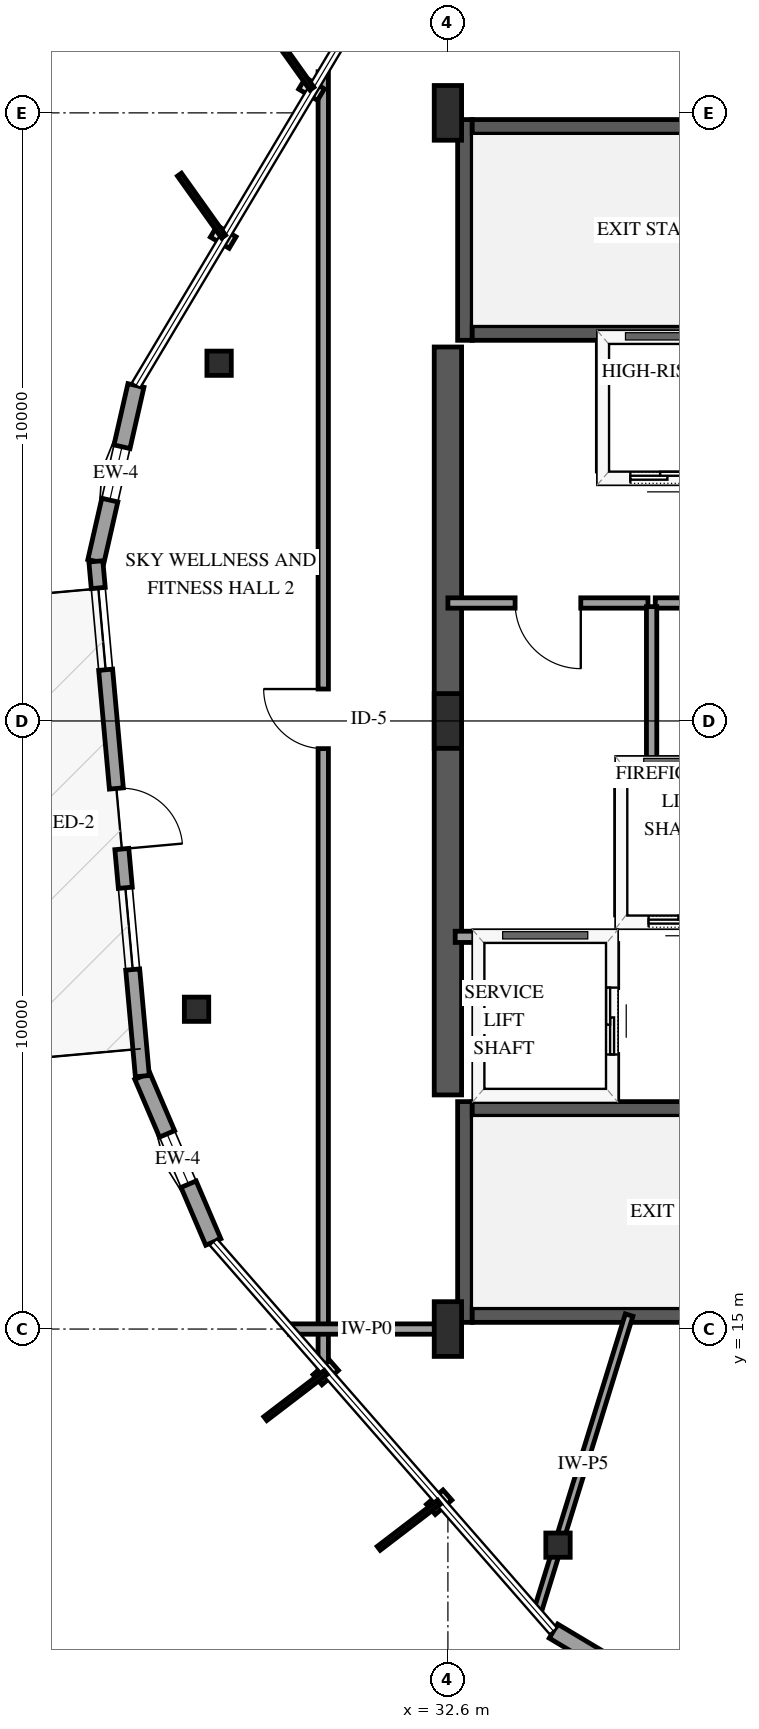
"""IFC4 building model, lengths in metres.
Left out: names, types, materials, properties, quantities, classifications, styles, units other than length and angle.
Written with IfcOpenShell. Run it as: python <this file> out.ifc"""

import sys

from ifc_helpers import new_model, si_unit, direction, frame, frame_2d, origin, origin_2d, place, context, subcontext, project, spatial, rectangle, i_section, extrude, element, fill, save


model = new_model("IFC4")
c1 = context("Model", 3, precision=1e-05, world=origin(), true_north=direction((0.0, 1.0)))
c2 = subcontext(c1, "Body", "Model", "MODEL_VIEW")
j1 = project(units=[si_unit("LENGTHUNIT", "METRE"), si_unit("PLANEANGLEUNIT", "RADIAN")], contexts=[c1])
p1 = place(None, origin())
s1 = spatial("IfcSite", under=j1, at=p1, CompositionType="ELEMENT")
p2 = place(p1, origin())
s2 = spatial("IfcBuilding", under=s1, at=p2, CompositionType="ELEMENT")
p3 = place(p2, frame((0.0, 0.0, 250.0)))
s3 = spatial("IfcBuildingStorey", under=s2, at=p3, CompositionType="ELEMENT", Elevation=250.0)
p4 = place(p3, frame((32.88, 15.11, 0.0), z_axis=(0.0, 0.0, 1.0), x_axis=(0.0, 1.0, 0.0)))
e1 = element("IfcWall", 1, at=p4, inside=s3, PredefinedType="SHEAR", context=c2, shape_type="SweptSolid", body=[
    extrude(rectangle(XDim=3.63, YDim=0.24, at=frame_2d((1.815, 0.0))), origin(), (0.0, 0.0, 1.0), 3.75),
])
for number, where, z_axis, x_axis in (
    (2, (33.0, 15.23, 0.0), (0.0, 0.0, 1.0), (1.0, 0.0, 0.0)),
    (3, (33.0, 18.62, 0.0), (0.0, 0.0, 1.0), (1.0, 0.0, 0.0)),
):
    element("IfcWall", number, at=place(p3, frame(where, z_axis=z_axis, x_axis=x_axis)), inside=s3, PredefinedType="SHEAR", context=c2, shape_type="SweptSolid", body=[
        extrude(rectangle(XDim=8.0, YDim=0.24, at=frame_2d((4.0, 0.0))), origin(), (0.0, 0.0, 1.0), 3.75),
    ])
p5 = place(p3, frame((32.88, 31.26, 0.0), z_axis=(0.0, 0.0, 1.0), x_axis=(0.0, 1.0, 0.0)))
e4 = element("IfcWall", 4, at=p5, inside=s3, PredefinedType="SHEAR", context=c2, shape_type="SweptSolid", body=[
    extrude(rectangle(XDim=3.63, YDim=0.24, at=frame_2d((1.815, 0.0))), origin(), (0.0, 0.0, 1.0), 3.75),
])
for number, where, z_axis, x_axis in (
    (5, (33.0, 31.38, 0.0), (0.0, 0.0, 1.0), (1.0, 0.0, 0.0)),
    (6, (33.0, 34.77, 0.0), (0.0, 0.0, 1.0), (1.0, 0.0, 0.0)),
):
    element("IfcWall", number, at=place(p3, frame(where, z_axis=z_axis, x_axis=x_axis)), inside=s3, PredefinedType="SHEAR", context=c2, shape_type="SweptSolid", body=[
        extrude(rectangle(XDim=8.0, YDim=0.24, at=frame_2d((4.0, 0.0))), origin(), (0.0, 0.0, 1.0), 3.75),
    ])
p6 = place(p3, frame((32.6, 18.85, 0.0), z_axis=(0.0, 0.0, 1.0), x_axis=(0.0, 1.0, 0.0)))
e7 = element("IfcWall", 7, at=p6, inside=s3, PredefinedType="SHEAR", context=c2, shape_type="SweptSolid", body=[
    extrude(rectangle(XDim=12.3, YDim=0.45, at=frame_2d((6.15, 0.0))), origin(), (0.0, 0.0, 1.0), 3.75),
])
for number, where, z_axis, x_axis in (
    (8, (32.6, 15.0, 0.0), (0.0, 0.0, 1.0), (1.0, 0.0, 0.0)),
    (9, (32.6, 25.0, 0.0), (0.0, 0.0, 1.0), (1.0, 0.0, 0.0)),
    (10, (32.6, 35.0, 0.0), (0.0, 0.0, 1.0), (1.0, 0.0, 0.0)),
):
    element("IfcColumn", number, at=place(p3, frame(where, z_axis=z_axis, x_axis=x_axis)), inside=s3, PredefinedType="PILASTER", context=c2, shape_type="SweptSolid", body=[
        extrude(rectangle(XDim=0.45, YDim=0.9, at=origin_2d()), origin(), (0.0, 0.0, 1.0), 3.75),
    ])
for number, where, z_axis, x_axis in (
    (11, (28.837, 30.883, 0.0), (0.0, 0.0, 1.0), (1.0, 0.0, 0.0)),
    (12, (28.466, 20.259, 0.0), (0.0, 0.0, 1.0), (1.0, 0.0, 0.0)),
    (13, (34.411, 11.446, 0.0), (0.0, 0.0, 1.0), (1.0, 0.0, 0.0)),
):
    element("IfcColumn", number, at=place(p3, frame(where, z_axis=z_axis, x_axis=x_axis)), inside=s3, PredefinedType="COLUMN", context=c2, shape_type="SweptSolid", body=[
        extrude(i_section(OverallWidth=0.401, OverallDepth=0.399, WebThickness=0.025, FlangeThickness=0.04, FilletRadius=0.038, at=origin_2d()), origin(), (0.0, 0.0, 1.0), 3.75),
    ])
p7 = place(p3, frame((27.469, 30.517, 0.0), z_axis=(0.0, 0.0, 1.0), x_axis=(-0.222190162384, -0.975003349604, 0.0)))
e14 = element("IfcWall", 14, at=p7, inside=s3, PredefinedType="SOLIDWALL", context=c2, shape_type="SweptSolid", body=[
    extrude(rectangle(XDim=2.967, YDim=0.27, at=frame_2d((1.483, 0.0))), origin(), (0.0, 0.0, 1.0), 2.829),
])
p8 = place(p7, frame((1.033, 0.0, 0.75)))
e15 = element("IfcOpeningElement", 15, at=p8, cuts=e14, PredefinedType="OPENING", context=c2, shape_type="SweptSolid", body=[
    extrude(rectangle(XDim=0.9, YDim=1.5, at=frame_2d((0.45, 0.75))), frame((0.0, 0.145, 0.0), z_axis=(0.0, -1.0, 0.0), x_axis=(1.0, 0.0, 0.0)), (0.0, 0.0, 1.0), 0.29),
])
p9 = place(p3, frame((27.575, 19.159, 0.0), z_axis=(0.0, 0.0, 1.0), x_axis=(0.393392799369, -0.919370494091, 0.0)))
e16 = element("IfcWall", 16, at=p9, inside=s3, PredefinedType="SOLIDWALL", context=c2, shape_type="SweptSolid", body=[
    extrude(rectangle(XDim=2.967, YDim=0.27, at=frame_2d((1.483, 0.0))), origin(), (0.0, 0.0, 1.0), 2.829),
])
p10 = place(p9, frame((1.033, 0.0, 0.75)))
e17 = element("IfcOpeningElement", 17, at=p10, cuts=e16, PredefinedType="OPENING", context=c2, shape_type="SweptSolid", body=[
    extrude(rectangle(XDim=0.9, YDim=1.5, at=frame_2d((0.45, 0.75))), frame((0.0, 0.145, 0.0), z_axis=(0.0, -1.0, 0.0), x_axis=(1.0, 0.0, 0.0)), (0.0, 0.0, 1.0), 0.29),
])
p11 = place(p3, frame((26.81, 27.625, 0.0), z_axis=(0.0, 0.0, 1.0), x_axis=(0.089932307003, -0.995947880241, 0.0)))
e18 = element("IfcWall", 18, at=p11, inside=s3, PredefinedType="SOLIDWALL", context=c2, shape_type="SweptSolid", body=[
    extrude(rectangle(XDim=8.5, YDim=0.23, at=frame_2d((4.25, 0.0))), origin(), (0.0, 0.0, 1.0), 2.829),
])
p12 = place(p11, frame((3.75, 0.0, 0.0)))
e19 = element("IfcOpeningElement", 19, at=p12, cuts=e18, PredefinedType="OPENING", context=c2, shape_type="SweptSolid", body=[
    extrude(rectangle(XDim=1.0, YDim=2.15, at=frame_2d((0.5, 1.075))), frame((0.0, 0.125, 0.0), z_axis=(0.0, -1.0, 0.0), x_axis=(1.0, 0.0, 0.0)), (0.0, 0.0, 1.0), 0.25),
])
p13 = place(p11, frame((0.44, 0.0, 0.72)))
e20 = element("IfcOpeningElement", 20, at=p13, cuts=e18, PredefinedType="OPENING", context=c2, shape_type="SweptSolid", body=[
    extrude(rectangle(XDim=1.35, YDim=1.65, at=frame_2d((0.675, 0.825))), frame((0.0, 0.125, 0.0), z_axis=(0.0, -1.0, 0.0), x_axis=(1.0, 0.0, 0.0)), (0.0, 0.0, 1.0), 0.25),
])
p14 = place(p11, frame((5.39, 0.0, 0.72)))
e21 = element("IfcOpeningElement", 21, at=p14, cuts=e18, PredefinedType="OPENING", context=c2, shape_type="SweptSolid", body=[
    extrude(rectangle(XDim=1.35, YDim=1.65, at=frame_2d((0.675, 0.825))), frame((0.0, 0.125, 0.0), z_axis=(0.0, -1.0, 0.0), x_axis=(1.0, 0.0, 0.0)), (0.0, 0.0, 1.0), 0.25),
])
p15 = place(p3, frame((34.336, 10.032, 0.0), z_axis=(0.0, 0.0, 1.0), x_axis=(0.858609177154, -0.512630745183, 0.0)))
e22 = element("IfcWall", 22, at=p15, inside=s3, PredefinedType="SOLIDWALL", context=c2, shape_type="SweptSolid", body=[
    extrude(rectangle(XDim=2.967, YDim=0.27, at=frame_2d((1.483, 0.0))), origin(), (0.0, 0.0, 1.0), 2.829),
])
p16 = place(p15, frame((1.033, 0.0, 0.75)))
e23 = element("IfcOpeningElement", 23, at=p16, cuts=e22, PredefinedType="OPENING", context=c2, shape_type="SweptSolid", body=[
    extrude(rectangle(XDim=0.9, YDim=1.5, at=frame_2d((0.45, 0.75))), frame((0.0, 0.145, 0.0), z_axis=(0.0, -1.0, 0.0), x_axis=(1.0, 0.0, 0.0)), (0.0, 0.0, 1.0), 0.29),
])
p17 = place(p3, frame((35.45, 21.7, 0.0), z_axis=(0.0, 0.0, 1.0), x_axis=(1.0, 0.0, 0.0)))
e24 = element("IfcWall", 24, at=p17, inside=s3, PredefinedType="SOLIDWALL", context=c2, shape_type="SweptSolid", body=[
    extrude(rectangle(XDim=2.0, YDim=0.185, at=frame_2d((1.0, 0.0))), origin(), (0.0, 0.0, 1.0), 2.824),
])
p18 = place(p17, frame((0.45, 0.0, 0.0)))
e25 = element("IfcOpeningElement", 25, at=p18, cuts=e24, PredefinedType="OPENING", context=c2, shape_type="SweptSolid", body=[
    extrude(rectangle(XDim=1.1, YDim=2.15, at=frame_2d((0.55, 1.075))), frame((0.0, 0.103, 0.0), z_axis=(0.0, -1.0, 0.0), x_axis=(1.0, 0.0, 0.0)), (0.0, 0.0, 1.0), 0.205),
])
p19 = place(p3, frame((35.45, 24.3, 0.0), z_axis=(0.0, 0.0, 1.0), x_axis=(1.0, 0.0, 0.0)))
e26 = element("IfcWall", 26, at=p19, inside=s3, PredefinedType="SOLIDWALL", context=c2, shape_type="SweptSolid", body=[
    extrude(rectangle(XDim=2.0, YDim=0.185, at=frame_2d((1.0, 0.0))), origin(), (0.0, 0.0, 1.0), 2.824),
])
p20 = place(p3, frame((35.45, 21.81, 0.0), z_axis=(0.0, 0.0, 1.0), x_axis=(0.0, 1.0, 0.0)))
e27 = element("IfcWall", 27, at=p20, inside=s3, PredefinedType="SOLIDWALL", context=c2, shape_type="SweptSolid", body=[
    extrude(rectangle(XDim=2.38, YDim=0.185, at=frame_2d((1.19, 0.0))), origin(), (0.0, 0.0, 1.0), 3.45),
])
p21 = place(p3, frame((32.72, 21.45, 0.0), z_axis=(0.0, 0.0, 1.0), x_axis=(1.0, 0.0, 0.0)))
e28 = element("IfcWall", 28, at=p21, inside=s3, PredefinedType="SOLIDWALL", context=c2, shape_type="SweptSolid", body=[
    extrude(rectangle(XDim=2.58, YDim=0.185, at=frame_2d((1.29, 0.0))), origin(), (0.0, 0.0, 1.0), 2.824),
])
p22 = place(p3, frame((35.3, 18.79, 0.0), z_axis=(0.0, 0.0, 1.0), x_axis=(0.0, 1.0, 0.0)))
e29 = element("IfcWall", 29, at=p22, inside=s3, PredefinedType="SOLIDWALL", context=c2, shape_type="SweptSolid", body=[
    extrude(rectangle(XDim=2.55, YDim=0.185, at=frame_2d((1.275, 0.0))), origin(), (0.0, 0.0, 1.0), 3.45),
])
p23 = place(p22, frame((0.725, 0.0, 0.0)))
e30 = element("IfcOpeningElement", 30, at=p23, cuts=e29, PredefinedType="OPENING", context=c2, shape_type="SweptSolid", body=[
    extrude(rectangle(XDim=1.1, YDim=2.15, at=frame_2d((0.55, 1.075))), frame((0.0, 0.103, 0.0), z_axis=(0.0, -1.0, 0.0), x_axis=(1.0, 0.0, 0.0)), (0.0, 0.0, 1.0), 0.205),
])
p24 = place(p3, frame((35.15, 29.0, 0.0), z_axis=(0.0, 0.0, 1.0), x_axis=(1.0, 0.0, 0.0)))
e31 = element("IfcWall", 31, at=p24, inside=s3, PredefinedType="SOLIDWALL", context=c2, shape_type="SweptSolid", body=[
    extrude(rectangle(XDim=2.0, YDim=0.185, at=frame_2d((1.0, 0.0))), origin(), (0.0, 0.0, 1.0), 3.45),
])
p25 = place(p24, frame((0.45, 0.0, 0.0)))
e32 = element("IfcOpeningElement", 32, at=p25, cuts=e31, PredefinedType="OPENING", context=c2, shape_type="SweptSolid", body=[
    extrude(rectangle(XDim=1.1, YDim=2.15, at=frame_2d((0.55, 1.075))), frame((0.0, 0.103, 0.0), z_axis=(0.0, -1.0, 0.0), x_axis=(1.0, 0.0, 0.0)), (0.0, 0.0, 1.0), 0.205),
])
p26 = place(p3, frame((35.15, 29.11, 0.0), z_axis=(0.0, 0.0, 1.0), x_axis=(0.0, 1.0, 0.0)))
e33 = element("IfcWall", 33, at=p26, inside=s3, PredefinedType="SOLIDWALL", context=c2, shape_type="SweptSolid", body=[
    extrude(rectangle(XDim=2.1, YDim=0.185, at=frame_2d((1.05, 0.0))), origin(), (0.0, 0.0, 1.0), 3.45),
])
p27 = place(p3, frame((30.55, 14.363, 0.0), z_axis=(0.0, 0.0, 1.0), x_axis=(0.0, 1.0, 0.0)))
e34 = element("IfcWall", 34, at=p27, inside=s3, PredefinedType="PARTITIONING", context=c2, shape_type="SweptSolid", body=[
    extrude(rectangle(XDim=21.313, YDim=0.17, at=frame_2d((10.656, 0.0))), origin(), (0.0, 0.0, 1.0), 3.45),
])
p28 = place(p27, frame((10.182, 0.0, 0.0)))
e35 = element("IfcOpeningElement", 35, at=p28, cuts=e34, PredefinedType="OPENING", context=c2, shape_type="SweptSolid", body=[
    extrude(rectangle(XDim=0.98, YDim=2.15, at=frame_2d((0.49, 1.075))), frame((0.0, 0.095, 0.0), z_axis=(0.0, -1.0, 0.0), x_axis=(1.0, 0.0, 0.0)), (0.0, 0.0, 1.0), 0.19),
])
p29 = place(p3, frame((41.16, 26.94, 0.0), z_axis=(0.0, 0.0, 1.0), x_axis=(-1.0, 0.0, 0.0)))
e36 = element("IfcWall", 36, at=p29, inside=s3, PredefinedType="PARTITIONING", context=c2, shape_type="SweptSolid", body=[
    extrude(rectangle(XDim=5.15, YDim=0.17, at=frame_2d((2.575, 0.0))), origin(), (0.0, 0.0, 1.0), 3.45),
])
p30 = place(p29, frame((2.035, 0.0, 0.0)))
e37 = element("IfcOpeningElement", 37, at=p30, cuts=e36, PredefinedType="OPENING", context=c2, shape_type="SweptSolid", body=[
    extrude(rectangle(XDim=1.08, YDim=2.15, at=frame_2d((0.54, 1.075))), frame((0.0, 0.095, 0.0), z_axis=(0.0, -1.0, 0.0), x_axis=(1.0, 0.0, 0.0)), (0.0, 0.0, 1.0), 0.19),
])
p31 = place(p3, frame((35.58, 15.23, 0.0), z_axis=(0.0, 0.0, 1.0), x_axis=(-0.295281740196, -0.95541022284, 0.0)))
e38 = element("IfcWall", 38, at=p31, inside=s3, PredefinedType="PARTITIONING", context=c2, shape_type="SweptSolid", body=[
    extrude(rectangle(XDim=5.12, YDim=0.13, at=frame_2d((2.56, 0.0))), origin(), (0.0, 0.0, 1.0), 2.745),
])
p32 = place(p3, frame((35.89, 26.94, 0.0), z_axis=(0.0, 0.0, 1.0), x_axis=(-1.0, 0.0, 0.0)))
e39 = element("IfcWall", 39, at=p32, inside=s3, PredefinedType="PARTITIONING", context=c2, shape_type="SweptSolid", body=[
    extrude(rectangle(XDim=3.29, YDim=0.17, at=frame_2d((1.645, 0.0))), origin(), (0.0, 0.0, 1.0), 3.45),
])
p33 = place(p32, frame((1.105, 0.0, 0.0)))
e40 = element("IfcOpeningElement", 40, at=p33, cuts=e39, PredefinedType="OPENING", context=c2, shape_type="SweptSolid", body=[
    extrude(rectangle(XDim=1.08, YDim=2.15, at=frame_2d((0.54, 1.075))), frame((0.0, 0.095, 0.0), z_axis=(0.0, -1.0, 0.0), x_axis=(1.0, 0.0, 0.0)), (0.0, 0.0, 1.0), 0.19),
])
p34 = place(p3, frame((35.95, 26.88, 0.0), z_axis=(0.0, 0.0, 1.0), x_axis=(0.0, -1.0, 0.0)))
e41 = element("IfcWall", 41, at=p34, inside=s3, PredefinedType="PARTITIONING", context=c2, shape_type="SweptSolid", body=[
    extrude(rectangle(XDim=2.58, YDim=0.17, at=frame_2d((1.29, 0.0))), origin(), (0.0, 0.0, 1.0), 3.45),
])
p35 = place(p3, frame((32.53, 15.0, 0.0), z_axis=(0.0, 0.0, 1.0), x_axis=(-1.0, 0.0, 0.0)))
e42 = element("IfcWall", 42, at=p35, inside=s3, PredefinedType="PARTITIONING", context=c2, shape_type="SweptSolid", body=[
    extrude(rectangle(XDim=2.537, YDim=0.17, at=frame_2d((1.269, 0.0))), origin(), (0.0, 0.0, 1.0), 3.45),
])
p36 = place(p8, origin())
e43 = element("IfcWindow", 43, at=p36, inside=s3, PartitioningType="SINGLE_PANEL", PredefinedType="WINDOW", context=c2, shape_type="SweptSolid", body=[
    extrude(rectangle(XDim=0.9, YDim=1.5, at=frame_2d((0.45, 0.75))), frame((0.0, 0.03, 0.0), z_axis=(0.0, -1.0, 0.0), x_axis=(1.0, 0.0, 0.0)), (0.0, 0.0, 1.0), 0.06),
])
fill(e15, e43)
p37 = place(p10, origin())
e44 = element("IfcWindow", 44, at=p37, inside=s3, PartitioningType="SINGLE_PANEL", PredefinedType="WINDOW", context=c2, shape_type="SweptSolid", body=[
    extrude(rectangle(XDim=0.9, YDim=1.5, at=frame_2d((0.45, 0.75))), frame((0.0, 0.03, 0.0), z_axis=(0.0, -1.0, 0.0), x_axis=(1.0, 0.0, 0.0)), (0.0, 0.0, 1.0), 0.06),
])
fill(e17, e44)
p38 = place(p12, origin())
e45 = element("IfcDoor", 45, at=p38, inside=s3, OperationType="SINGLE_SWING_RIGHT", PredefinedType="DOOR", context=c2, shape_type="SweptSolid", body=[
    extrude(rectangle(XDim=1.0, YDim=2.15, at=frame_2d((0.5, 1.075))), frame((0.0, 0.025, 0.0), z_axis=(0.0, -1.0, 0.0), x_axis=(1.0, 0.0, 0.0)), (0.0, 0.0, 1.0), 0.05),
])
fill(e19, e45)
p39 = place(p13, origin())
e46 = element("IfcWindow", 46, at=p39, inside=s3, PartitioningType="SINGLE_PANEL", PredefinedType="WINDOW", context=c2, shape_type="SweptSolid", body=[
    extrude(rectangle(XDim=1.35, YDim=1.65, at=frame_2d((0.675, 0.825))), frame((0.0, 0.03, 0.0), z_axis=(0.0, -1.0, 0.0), x_axis=(1.0, 0.0, 0.0)), (0.0, 0.0, 1.0), 0.06),
])
fill(e20, e46)
p40 = place(p14, origin())
e47 = element("IfcWindow", 47, at=p40, inside=s3, PartitioningType="SINGLE_PANEL", PredefinedType="WINDOW", context=c2, shape_type="SweptSolid", body=[
    extrude(rectangle(XDim=1.35, YDim=1.65, at=frame_2d((0.675, 0.825))), frame((0.0, 0.03, 0.0), z_axis=(0.0, -1.0, 0.0), x_axis=(1.0, 0.0, 0.0)), (0.0, 0.0, 1.0), 0.06),
])
fill(e21, e47)
p41 = place(p18, origin())
e48 = element("IfcDoor", 48, at=p41, inside=s3, OperationType="SLIDING_TO_LEFT", PredefinedType="DOOR", context=c2, shape_type="SweptSolid", body=[
    extrude(rectangle(XDim=1.1, YDim=2.15, at=frame_2d((0.55, 1.075))), frame((0.0, 0.025, 0.0), z_axis=(0.0, -1.0, 0.0), x_axis=(1.0, 0.0, 0.0)), (0.0, 0.0, 1.0), 0.05),
])
fill(e25, e48)
p42 = place(p23, origin())
e49 = element("IfcDoor", 49, at=p42, inside=s3, OperationType="SLIDING_TO_LEFT", PredefinedType="DOOR", context=c2, shape_type="SweptSolid", body=[
    extrude(rectangle(XDim=1.1, YDim=2.15, at=frame_2d((0.55, 1.075))), frame((0.0, 0.025, 0.0), z_axis=(0.0, -1.0, 0.0), x_axis=(1.0, 0.0, 0.0)), (0.0, 0.0, 1.0), 0.05),
])
fill(e30, e49)
p43 = place(p25, origin())
e50 = element("IfcDoor", 50, at=p43, inside=s3, OperationType="SLIDING_TO_LEFT", PredefinedType="DOOR", context=c2, shape_type="SweptSolid", body=[
    extrude(rectangle(XDim=1.1, YDim=2.15, at=frame_2d((0.55, 1.075))), frame((0.0, 0.025, 0.0), z_axis=(0.0, -1.0, 0.0), x_axis=(1.0, 0.0, 0.0)), (0.0, 0.0, 1.0), 0.05),
])
fill(e32, e50)
p44 = place(p28, origin())
e51 = element("IfcDoor", 51, at=p44, inside=s3, OperationType="SINGLE_SWING_RIGHT", PredefinedType="DOOR", context=c2, shape_type="SweptSolid", body=[
    extrude(rectangle(XDim=0.98, YDim=2.15, at=frame_2d((0.49, 1.075))), frame((0.0, 0.025, 0.0), z_axis=(0.0, -1.0, 0.0), x_axis=(1.0, 0.0, 0.0)), (0.0, 0.0, 1.0), 0.05),
])
fill(e35, e51)
p45 = place(p33, origin())
e52 = element("IfcDoor", 52, at=p45, inside=s3, OperationType="SINGLE_SWING_LEFT", PredefinedType="DOOR", context=c2, shape_type="SweptSolid", body=[
    extrude(rectangle(XDim=1.08, YDim=2.15, at=frame_2d((0.54, 1.075))), frame((0.0, 0.025, 0.0), z_axis=(0.0, -1.0, 0.0), x_axis=(1.0, 0.0, 0.0)), (0.0, 0.0, 1.0), 0.05),
])
fill(e40, e52)
save(model, sys.argv[1])
